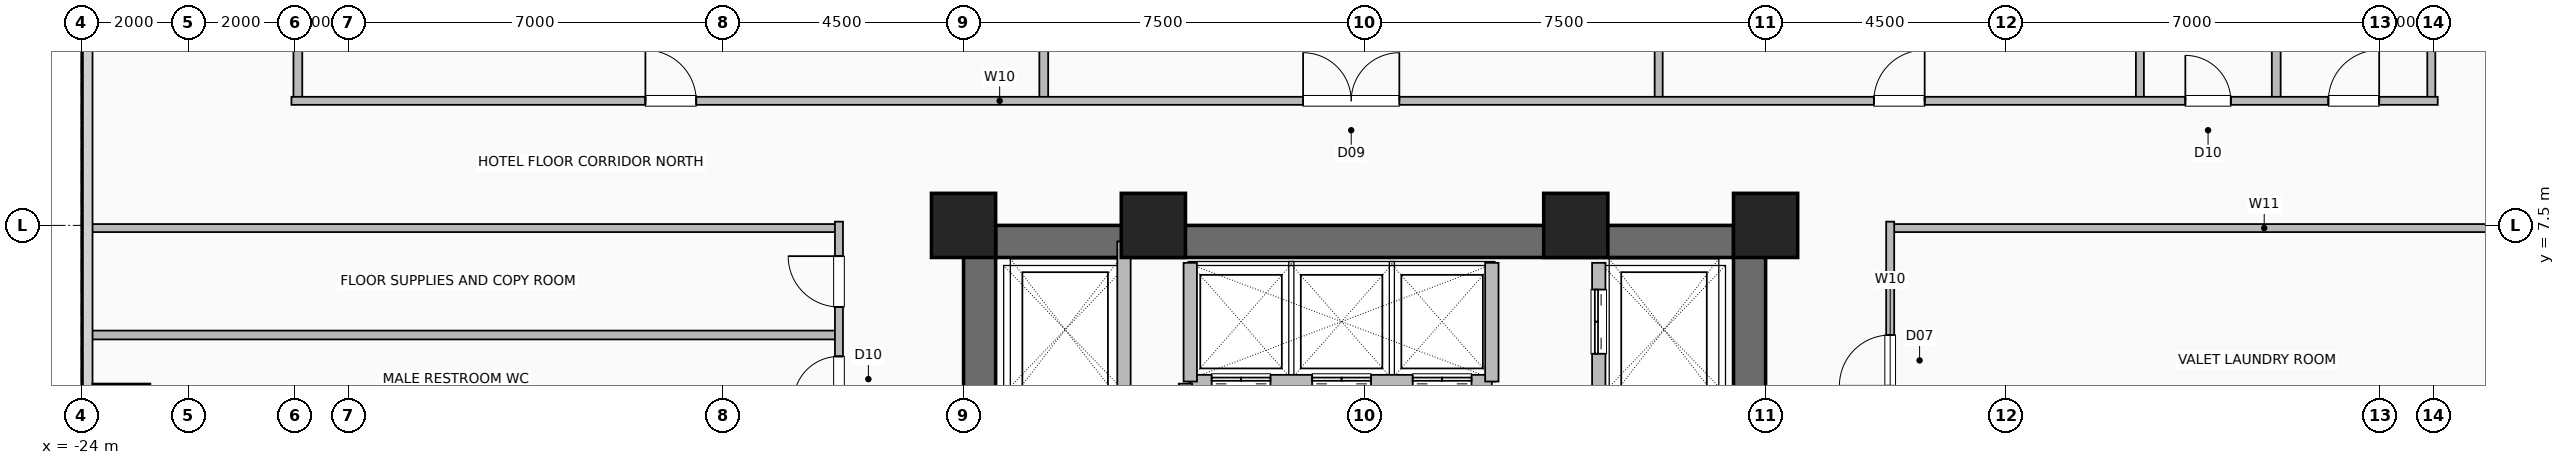
"""IFC4 building model, lengths in metres.
Left out: names, types, materials, properties, quantities, classifications, styles, units other than length and angle.
Written with IfcOpenShell. Run it as: python <this file> out.ifc"""

import sys

from ifc_helpers import new_model, si_unit, direction, frame, frame_2d, origin, origin_2d, place, context, subcontext, project, spatial, rectangle, hollow_rectangle, extrude, element, fill, save


model = new_model("IFC4")
c1 = context("Model", 3, precision=1e-05, world=origin(), true_north=direction((0.0, 1.0)))
c2 = subcontext(c1, "Body", "Model", "MODEL_VIEW")
j1 = project(units=[si_unit("LENGTHUNIT", "METRE"), si_unit("PLANEANGLEUNIT", "RADIAN")], contexts=[c1])
p1 = place(None, origin())
s1 = spatial("IfcSite", under=j1, at=p1, CompositionType="ELEMENT")
p2 = place(p1, origin())
s2 = spatial("IfcBuilding", under=s1, at=p2, CompositionType="ELEMENT")
p3 = place(p2, frame((0.0, 0.0, 44.5)))
s3 = spatial("IfcBuildingStorey", under=s2, at=p3, CompositionType="ELEMENT", Elevation=44.5)
for number, where, z_axis, x_axis in (
    (1, (7.5, 7.5, 0.0), (0.0, 0.0, 1.0), (1.0, 0.0, 0.0)),
    (2, (3.95, 7.5, 0.0), (0.0, 0.0, 1.0), (1.0, 0.0, 0.0)),
    (3, (-3.95, 7.5, 0.0), (0.0, 0.0, 1.0), (1.0, 0.0, 0.0)),
    (4, (-7.5, 7.5, 0.0), (0.0, 0.0, 1.0), (1.0, 0.0, 0.0)),
):
    element("IfcColumn", number, at=place(p3, frame(where, z_axis=z_axis, x_axis=x_axis)), inside=s3, PredefinedType="COLUMN", context=c2, shape_type="SweptSolid", body=[
        extrude(hollow_rectangle(XDim=1.2, YDim=1.2, WallThickness=0.055, at=origin_2d()), origin(), (0.0, 0.0, 1.0), 3.5),
    ])
p4 = place(p3, frame((-7.5, 7.2, 0.0), z_axis=(0.0, 0.0, 1.0), x_axis=(1.0, 0.0, 0.0)))
e5 = element("IfcWall", 5, at=p4, inside=s3, PredefinedType="SHEAR", context=c2, shape_type="SweptSolid", body=[
    extrude(rectangle(XDim=15.0, YDim=0.6, at=frame_2d((7.5, 0.0))), origin(), (0.0, 0.0, 1.0), 3.25),
])
p5 = place(p3, frame((-7.2, -7.5, 0.0), z_axis=(0.0, 0.0, 1.0), x_axis=(0.0, 1.0, 0.0)))
e6 = element("IfcWall", 6, at=p5, inside=s3, PredefinedType="SHEAR", context=c2, shape_type="SweptSolid", body=[
    extrude(rectangle(XDim=15.0, YDim=0.6, at=frame_2d((7.5, 0.0))), origin(), (0.0, 0.0, 1.0), 3.25),
])
p6 = place(p5, frame((9.5, 0.0, 0.0)))
e7 = element("IfcOpeningElement", 7, at=p6, cuts=e6, PredefinedType="OPENING", context=c2, shape_type="SweptSolid", body=[
    extrude(rectangle(XDim=1.0, YDim=2.08, at=frame_2d((0.5, 1.04))), frame((0.0, 0.31, 0.0), z_axis=(0.0, -1.0, 0.0), x_axis=(1.0, 0.0, 0.0)), (0.0, 0.0, 1.0), 0.62),
])
p7 = place(p3, frame((7.2, -7.5, 0.0), z_axis=(0.0, 0.0, 1.0), x_axis=(0.0, 1.0, 0.0)))
e8 = element("IfcWall", 8, at=p7, inside=s3, PredefinedType="SHEAR", context=c2, shape_type="SweptSolid", body=[
    extrude(rectangle(XDim=15.0, YDim=0.6, at=frame_2d((7.5, 0.0))), origin(), (0.0, 0.0, 1.0), 3.25),
])
p8 = place(p3, frame((-3.26, 4.58, 0.0), z_axis=(0.0, 0.0, 1.0), x_axis=(1.0, 0.0, 0.0)))
e9 = element("IfcWall", 9, at=p8, inside=s3, PredefinedType="SHEAR", context=c2, shape_type="SweptSolid", body=[
    extrude(rectangle(XDim=5.64, YDim=0.25, at=frame_2d((2.82, 0.0))), origin(), (0.0, 0.0, 1.0), 3.25),
])
p9 = place(p8, frame((0.4, 0.0, 0.0)))
e10 = element("IfcOpeningElement", 10, at=p9, cuts=e9, PredefinedType="OPENING", context=c2, shape_type="SweptSolid", body=[
    extrude(rectangle(XDim=1.1, YDim=2.2, at=frame_2d((0.55, 1.1))), frame((0.0, 0.135, 0.0), z_axis=(0.0, -1.0, 0.0), x_axis=(1.0, 0.0, 0.0)), (0.0, 0.0, 1.0), 0.27),
])
p10 = place(p8, frame((2.28, 0.0, 0.0)))
e11 = element("IfcOpeningElement", 11, at=p10, cuts=e9, PredefinedType="OPENING", context=c2, shape_type="SweptSolid", body=[
    extrude(rectangle(XDim=1.1, YDim=2.2, at=frame_2d((0.55, 1.1))), frame((0.0, 0.135, 0.0), z_axis=(0.0, -1.0, 0.0), x_axis=(1.0, 0.0, 0.0)), (0.0, 0.0, 1.0), 0.27),
])
p11 = place(p8, frame((4.16, 0.0, 0.0)))
e12 = element("IfcOpeningElement", 12, at=p11, cuts=e9, PredefinedType="OPENING", context=c2, shape_type="SweptSolid", body=[
    extrude(rectangle(XDim=1.1, YDim=2.2, at=frame_2d((0.55, 1.1))), frame((0.0, 0.135, 0.0), z_axis=(0.0, -1.0, 0.0), x_axis=(1.0, 0.0, 0.0)), (0.0, 0.0, 1.0), 0.27),
])
for number, where, z_axis, x_axis in (
    (13, (-3.26, 4.58, 0.0), (0.0, 0.0, 1.0), (0.0, 1.0, 0.0)),
    (14, (2.38, 4.58, 0.0), (0.0, 0.0, 1.0), (0.0, 1.0, 0.0)),
):
    element("IfcWall", number, at=place(p3, frame(where, z_axis=z_axis, x_axis=x_axis)), inside=s3, PredefinedType="SHEAR", context=c2, shape_type="SweptSolid", body=[
        extrude(rectangle(XDim=2.22, YDim=0.25, at=frame_2d((1.11, 0.0))), origin(), (0.0, 0.0, 1.0), 3.25),
    ])
p12 = place(p3, frame((-4.5, 4.35, 0.0), z_axis=(0.0, 0.0, 1.0), x_axis=(0.0, 1.0, 0.0)))
e15 = element("IfcWall", 15, at=p12, inside=s3, PredefinedType="SHEAR", context=c2, shape_type="SweptSolid", body=[
    extrude(rectangle(XDim=2.85, YDim=0.25, at=frame_2d((1.425, 0.0))), origin(), (0.0, 0.0, 1.0), 3.25),
])
p13 = place(p3, frame((4.38, 4.3, 0.0), z_axis=(0.0, 0.0, 1.0), x_axis=(0.0, 1.0, 0.0)))
e16 = element("IfcWall", 16, at=p13, inside=s3, PredefinedType="SHEAR", context=c2, shape_type="SweptSolid", body=[
    extrude(rectangle(XDim=2.5, YDim=0.25, at=frame_2d((1.25, 0.0))), origin(), (0.0, 0.0, 1.0), 3.25),
])
p14 = place(p13, frame((0.8, 0.0, 0.0)))
e17 = element("IfcOpeningElement", 17, at=p14, cuts=e16, PredefinedType="OPENING", context=c2, shape_type="SweptSolid", body=[
    extrude(rectangle(XDim=1.2, YDim=2.2, at=frame_2d((0.6, 1.1))), frame((0.0, 0.135, 0.0), z_axis=(0.0, -1.0, 0.0), x_axis=(1.0, 0.0, 0.0)), (0.0, 0.0, 1.0), 0.27),
])
p15 = place(p3, frame((-3.35, 0.92, 0.0), z_axis=(0.0, 0.0, 1.0), x_axis=(0.0, 1.0, 0.0)))
e18 = element("IfcWall", 18, at=p15, inside=s3, PredefinedType="SHEAR", context=c2, shape_type="SweptSolid", body=[
    extrude(rectangle(XDim=3.62, YDim=0.25, at=frame_2d((1.81, 0.0))), origin(), (0.0, 0.0, 1.0), 3.25),
])
p16 = place(p15, frame((1.85, 0.0, 0.0)))
e19 = element("IfcOpeningElement", 19, at=p16, cuts=e18, PredefinedType="OPENING", context=c2, shape_type="SweptSolid", body=[
    extrude(rectangle(XDim=1.0, YDim=2.08, at=frame_2d((0.5, 1.04))), frame((0.0, 0.135, 0.0), z_axis=(0.0, -1.0, 0.0), x_axis=(1.0, 0.0, 0.0)), (0.0, 0.0, 1.0), 0.27),
])
for number, where, z_axis, x_axis in (
    (20, (17.05, 9.83, 0.0), (0.0, 0.0, 1.0), (0.0, 1.0, 0.0)),
    (21, (-19.95, 9.83, 0.0), (0.0, 0.0, 1.0), (0.0, 1.0, 0.0)),
    (22, (-6.0, 9.83, 0.0), (0.0, 0.0, 1.0), (0.0, 1.0, 0.0)),
):
    element("IfcWall", number, at=place(p3, frame(where, z_axis=z_axis, x_axis=x_axis)), inside=s3, PredefinedType="PLUMBINGWALL", context=c2, shape_type="SweptSolid", body=[
        extrude(rectangle(XDim=13.99, YDim=0.165, at=frame_2d((6.995, 0.0))), origin(), (0.0, 0.0, 1.0), 3.25),
    ])
for number, where, z_axis, x_axis in (
    (23, (5.5, 9.83, 0.0), (0.0, 0.0, 1.0), (0.0, 1.0, 0.0)),
    (24, (14.5, 9.83, 0.0), (0.0, 0.0, 1.0), (0.0, 1.0, 0.0)),
    (25, (19.95, 9.83, 0.0), (0.0, 0.0, 1.0), (0.0, 1.0, 0.0)),
):
    element("IfcWall", number, at=place(p3, frame(where, z_axis=z_axis, x_axis=x_axis)), inside=s3, PredefinedType="PARTITIONING", context=c2, shape_type="SweptSolid", body=[
        extrude(rectangle(XDim=13.99, YDim=0.15, at=frame_2d((6.995, 0.0))), origin(), (0.0, 0.0, 1.0), 3.25),
    ])
p17 = place(p3, frame((-20.07, 9.83, 0.0), z_axis=(0.0, 0.0, 1.0), x_axis=(1.0, 0.0, 0.0)))
e26 = element("IfcWall", 26, at=p17, inside=s3, PredefinedType="PARTITIONING", context=c2, shape_type="SweptSolid", body=[
    extrude(rectangle(XDim=40.14, YDim=0.15, at=frame_2d((20.07, 0.0))), origin(), (0.0, 0.0, 1.0), 3.25),
])
p18 = place(p17, frame((6.62, 0.0, 0.0)))
e27 = element("IfcOpeningElement", 27, at=p18, cuts=e26, PredefinedType="OPENING", context=c2, shape_type="SweptSolid", body=[
    extrude(rectangle(XDim=0.95, YDim=2.06, at=frame_2d((0.475, 1.03))), frame((0.0, 0.085, 0.0), z_axis=(0.0, -1.0, 0.0), x_axis=(1.0, 0.0, 0.0)), (0.0, 0.0, 1.0), 0.17),
])
p19 = place(p17, frame((18.92, 0.0, 0.0)))
e28 = element("IfcOpeningElement", 28, at=p19, cuts=e26, PredefinedType="OPENING", context=c2, shape_type="SweptSolid", body=[
    extrude(rectangle(XDim=1.8, YDim=2.08, at=frame_2d((0.9, 1.04))), frame((0.0, 0.085, 0.0), z_axis=(0.0, -1.0, 0.0), x_axis=(1.0, 0.0, 0.0)), (0.0, 0.0, 1.0), 0.17),
])
p20 = place(p17, frame((29.595, 0.0, 0.0)))
e29 = element("IfcOpeningElement", 29, at=p20, cuts=e26, PredefinedType="OPENING", context=c2, shape_type="SweptSolid", body=[
    extrude(rectangle(XDim=0.95, YDim=2.06, at=frame_2d((0.475, 1.03))), frame((0.0, 0.085, 0.0), z_axis=(0.0, -1.0, 0.0), x_axis=(1.0, 0.0, 0.0)), (0.0, 0.0, 1.0), 0.17),
])
p21 = place(p17, frame((35.42, 0.0, 0.0)))
e30 = element("IfcOpeningElement", 30, at=p21, cuts=e26, PredefinedType="OPENING", context=c2, shape_type="SweptSolid", body=[
    extrude(rectangle(XDim=0.85, YDim=2.05, at=frame_2d((0.425, 1.025))), frame((0.0, 0.085, 0.0), z_axis=(0.0, -1.0, 0.0), x_axis=(1.0, 0.0, 0.0)), (0.0, 0.0, 1.0), 0.17),
])
p22 = place(p17, frame((38.095, 0.0, 0.0)))
e31 = element("IfcOpeningElement", 31, at=p22, cuts=e26, PredefinedType="OPENING", context=c2, shape_type="SweptSolid", body=[
    extrude(rectangle(XDim=0.95, YDim=2.06, at=frame_2d((0.475, 1.03))), frame((0.0, 0.085, 0.0), z_axis=(0.0, -1.0, 0.0), x_axis=(1.0, 0.0, 0.0)), (0.0, 0.0, 1.0), 0.17),
])
p23 = place(p3, frame((-23.82, 5.45, 0.0), z_axis=(0.0, 0.0, 1.0), x_axis=(1.0, 0.0, 0.0)))
e32 = element("IfcWall", 32, at=p23, inside=s3, PredefinedType="PLUMBINGWALL", context=c2, shape_type="SweptSolid", body=[
    extrude(rectangle(XDim=13.99, YDim=0.165, at=frame_2d((6.995, 0.0))), origin(), (0.0, 0.0, 1.0), 3.25),
])
p24 = place(p3, frame((-23.82, 7.45, 0.0), z_axis=(0.0, 0.0, 1.0), x_axis=(1.0, 0.0, 0.0)))
e33 = element("IfcWall", 33, at=p24, inside=s3, PredefinedType="PARTITIONING", context=c2, shape_type="SweptSolid", body=[
    extrude(rectangle(XDim=13.99, YDim=0.15, at=frame_2d((6.995, 0.0))), origin(), (0.0, 0.0, 1.0), 3.25),
])
p25 = place(p3, frame((-9.83, -7.57, 0.0), z_axis=(0.0, 0.0, 1.0), x_axis=(0.0, 1.0, 0.0)))
e34 = element("IfcWall", 34, at=p25, inside=s3, PredefinedType="PARTITIONING", context=c2, shape_type="SweptSolid", body=[
    extrude(rectangle(XDim=15.14, YDim=0.15, at=frame_2d((7.57, 0.0))), origin(), (0.0, 0.0, 1.0), 3.25),
])
p26 = place(p25, frame((4.845, 0.0, 0.0)))
e35 = element("IfcOpeningElement", 35, at=p26, cuts=e34, PredefinedType="OPENING", context=c2, shape_type="SweptSolid", body=[
    extrude(rectangle(XDim=1.8, YDim=2.08, at=frame_2d((0.9, 1.04))), frame((0.0, 0.085, 0.0), z_axis=(0.0, -1.0, 0.0), x_axis=(1.0, 0.0, 0.0)), (0.0, 0.0, 1.0), 0.17),
])
p27 = place(p25, frame((11.77, 0.0, 0.0)))
e36 = element("IfcOpeningElement", 36, at=p27, cuts=e34, PredefinedType="OPENING", context=c2, shape_type="SweptSolid", body=[
    extrude(rectangle(XDim=0.85, YDim=2.05, at=frame_2d((0.425, 1.025))), frame((0.0, 0.085, 0.0), z_axis=(0.0, -1.0, 0.0), x_axis=(1.0, 0.0, 0.0)), (0.0, 0.0, 1.0), 0.17),
])
p28 = place(p25, frame((13.545, 0.0, 0.0)))
e37 = element("IfcOpeningElement", 37, at=p28, cuts=e34, PredefinedType="OPENING", context=c2, shape_type="SweptSolid", body=[
    extrude(rectangle(XDim=0.95, YDim=2.06, at=frame_2d((0.475, 1.03))), frame((0.0, 0.085, 0.0), z_axis=(0.0, -1.0, 0.0), x_axis=(1.0, 0.0, 0.0)), (0.0, 0.0, 1.0), 0.17),
])
p29 = place(p3, frame((9.83, 7.45, 0.0), z_axis=(0.0, 0.0, 1.0), x_axis=(1.0, 0.0, 0.0)))
e38 = element("IfcWall", 38, at=p29, inside=s3, PredefinedType="PARTITIONING", context=c2, shape_type="SweptSolid", body=[
    extrude(rectangle(XDim=13.99, YDim=0.15, at=frame_2d((6.995, 0.0))), origin(), (0.0, 0.0, 1.0), 3.25),
])
p30 = place(p3, frame((9.83, -7.57, 0.0), z_axis=(0.0, 0.0, 1.0), x_axis=(0.0, 1.0, 0.0)))
e39 = element("IfcWall", 39, at=p30, inside=s3, PredefinedType="PARTITIONING", context=c2, shape_type="SweptSolid", body=[
    extrude(rectangle(XDim=15.14, YDim=0.15, at=frame_2d((7.57, 0.0))), origin(), (0.0, 0.0, 1.0), 3.25),
])
p31 = place(p30, frame((2.12, 0.0, 0.0)))
e40 = element("IfcOpeningElement", 40, at=p31, cuts=e39, PredefinedType="OPENING", context=c2, shape_type="SweptSolid", body=[
    extrude(rectangle(XDim=0.95, YDim=2.06, at=frame_2d((0.475, 1.03))), frame((0.0, 0.085, 0.0), z_axis=(0.0, -1.0, 0.0), x_axis=(1.0, 0.0, 0.0)), (0.0, 0.0, 1.0), 0.17),
])
p32 = place(p30, frame((7.095, 0.0, 0.0)))
e41 = element("IfcOpeningElement", 41, at=p32, cuts=e39, PredefinedType="OPENING", context=c2, shape_type="SweptSolid", body=[
    extrude(rectangle(XDim=0.95, YDim=2.06, at=frame_2d((0.475, 1.03))), frame((0.0, 0.085, 0.0), z_axis=(0.0, -1.0, 0.0), x_axis=(1.0, 0.0, 0.0)), (0.0, 0.0, 1.0), 0.17),
])
p33 = place(p30, frame((12.07, 0.0, 0.0)))
e42 = element("IfcOpeningElement", 42, at=p33, cuts=e39, PredefinedType="OPENING", context=c2, shape_type="SweptSolid", body=[
    extrude(rectangle(XDim=0.95, YDim=2.06, at=frame_2d((0.475, 1.03))), frame((0.0, 0.085, 0.0), z_axis=(0.0, -1.0, 0.0), x_axis=(1.0, 0.0, 0.0)), (0.0, 0.0, 1.0), 0.17),
])
p34 = place(p9, origin())
e43 = element("IfcDoor", 43, at=p34, inside=s3, OperationType="DOUBLE_DOOR_SLIDING", PredefinedType="DOOR", context=c2, shape_type="SweptSolid", body=[
    extrude(rectangle(XDim=1.1, YDim=2.2, at=frame_2d((0.55, 1.1))), frame((0.0, 0.025, 0.0), z_axis=(0.0, -1.0, 0.0), x_axis=(1.0, 0.0, 0.0)), (0.0, 0.0, 1.0), 0.05),
])
fill(e10, e43)
p35 = place(p10, origin())
e44 = element("IfcDoor", 44, at=p35, inside=s3, OperationType="DOUBLE_DOOR_SLIDING", PredefinedType="DOOR", context=c2, shape_type="SweptSolid", body=[
    extrude(rectangle(XDim=1.1, YDim=2.2, at=frame_2d((0.55, 1.1))), frame((0.0, 0.025, 0.0), z_axis=(0.0, -1.0, 0.0), x_axis=(1.0, 0.0, 0.0)), (0.0, 0.0, 1.0), 0.05),
])
fill(e11, e44)
p36 = place(p11, origin())
e45 = element("IfcDoor", 45, at=p36, inside=s3, OperationType="DOUBLE_DOOR_SLIDING", PredefinedType="DOOR", context=c2, shape_type="SweptSolid", body=[
    extrude(rectangle(XDim=1.1, YDim=2.2, at=frame_2d((0.55, 1.1))), frame((0.0, 0.025, 0.0), z_axis=(0.0, -1.0, 0.0), x_axis=(1.0, 0.0, 0.0)), (0.0, 0.0, 1.0), 0.05),
])
fill(e12, e45)
p37 = place(p14, origin())
e46 = element("IfcDoor", 46, at=p37, inside=s3, OperationType="DOUBLE_DOOR_SLIDING", PredefinedType="DOOR", context=c2, shape_type="SweptSolid", body=[
    extrude(rectangle(XDim=1.2, YDim=2.2, at=frame_2d((0.6, 1.1))), frame((0.0, 0.025, 0.0), z_axis=(0.0, -1.0, 0.0), x_axis=(1.0, 0.0, 0.0)), (0.0, 0.0, 1.0), 0.05),
])
fill(e17, e46)
p38 = place(p18, origin())
e47 = element("IfcDoor", 47, at=p38, inside=s3, OperationType="SINGLE_SWING_LEFT", PredefinedType="DOOR", context=c2, shape_type="SweptSolid", body=[
    extrude(rectangle(XDim=0.95, YDim=2.06, at=frame_2d((0.475, 1.03))), frame((0.0, 0.025, 0.0), z_axis=(0.0, -1.0, 0.0), x_axis=(1.0, 0.0, 0.0)), (0.0, 0.0, 1.0), 0.05),
])
fill(e27, e47)
p39 = place(p19, origin())
e48 = element("IfcDoor", 48, at=p39, inside=s3, OperationType="DOUBLE_DOOR_SINGLE_SWING", PredefinedType="DOOR", context=c2, shape_type="SweptSolid", body=[
    extrude(rectangle(XDim=1.8, YDim=2.08, at=frame_2d((0.9, 1.04))), frame((0.0, 0.025, 0.0), z_axis=(0.0, -1.0, 0.0), x_axis=(1.0, 0.0, 0.0)), (0.0, 0.0, 1.0), 0.05),
])
fill(e28, e48)
p40 = place(p20, origin())
e49 = element("IfcDoor", 49, at=p40, inside=s3, OperationType="SINGLE_SWING_RIGHT", PredefinedType="DOOR", context=c2, shape_type="SweptSolid", body=[
    extrude(rectangle(XDim=0.95, YDim=2.06, at=frame_2d((0.475, 1.03))), frame((0.0, 0.025, 0.0), z_axis=(0.0, -1.0, 0.0), x_axis=(1.0, 0.0, 0.0)), (0.0, 0.0, 1.0), 0.05),
])
fill(e29, e49)
p41 = place(p21, origin())
e50 = element("IfcDoor", 50, at=p41, inside=s3, OperationType="SINGLE_SWING_LEFT", PredefinedType="DOOR", context=c2, shape_type="SweptSolid", body=[
    extrude(rectangle(XDim=0.85, YDim=2.05, at=frame_2d((0.425, 1.025))), frame((0.0, 0.025, 0.0), z_axis=(0.0, -1.0, 0.0), x_axis=(1.0, 0.0, 0.0)), (0.0, 0.0, 1.0), 0.05),
])
fill(e30, e50)
p42 = place(p22, origin())
e51 = element("IfcDoor", 51, at=p42, inside=s3, OperationType="SINGLE_SWING_RIGHT", PredefinedType="DOOR", context=c2, shape_type="SweptSolid", body=[
    extrude(rectangle(XDim=0.95, YDim=2.06, at=frame_2d((0.475, 1.03))), frame((0.0, 0.025, 0.0), z_axis=(0.0, -1.0, 0.0), x_axis=(1.0, 0.0, 0.0)), (0.0, 0.0, 1.0), 0.05),
])
fill(e31, e51)
p43 = place(p27, origin())
e52 = element("IfcDoor", 52, at=p43, inside=s3, OperationType="SINGLE_SWING_LEFT", PredefinedType="DOOR", context=c2, shape_type="SweptSolid", body=[
    extrude(rectangle(XDim=0.85, YDim=2.05, at=frame_2d((0.425, 1.025))), frame((0.0, 0.025, 0.0), z_axis=(0.0, -1.0, 0.0), x_axis=(1.0, 0.0, 0.0)), (0.0, 0.0, 1.0), 0.05),
])
fill(e36, e52)
p44 = place(p28, origin())
e53 = element("IfcDoor", 53, at=p44, inside=s3, OperationType="SINGLE_SWING_RIGHT", PredefinedType="DOOR", context=c2, shape_type="SweptSolid", body=[
    extrude(rectangle(XDim=0.95, YDim=2.06, at=frame_2d((0.475, 1.03))), frame((0.0, 0.025, 0.0), z_axis=(0.0, -1.0, 0.0), x_axis=(1.0, 0.0, 0.0)), (0.0, 0.0, 1.0), 0.05),
])
fill(e37, e53)
p45 = place(p33, origin())
e54 = element("IfcDoor", 54, at=p45, inside=s3, OperationType="SINGLE_SWING_LEFT", PredefinedType="DOOR", context=c2, shape_type="SweptSolid", body=[
    extrude(rectangle(XDim=0.95, YDim=2.06, at=frame_2d((0.475, 1.03))), frame((0.0, 0.025, 0.0), z_axis=(0.0, -1.0, 0.0), x_axis=(1.0, 0.0, 0.0)), (0.0, 0.0, 1.0), 0.05),
])
fill(e42, e54)
save(model, sys.argv[1])
